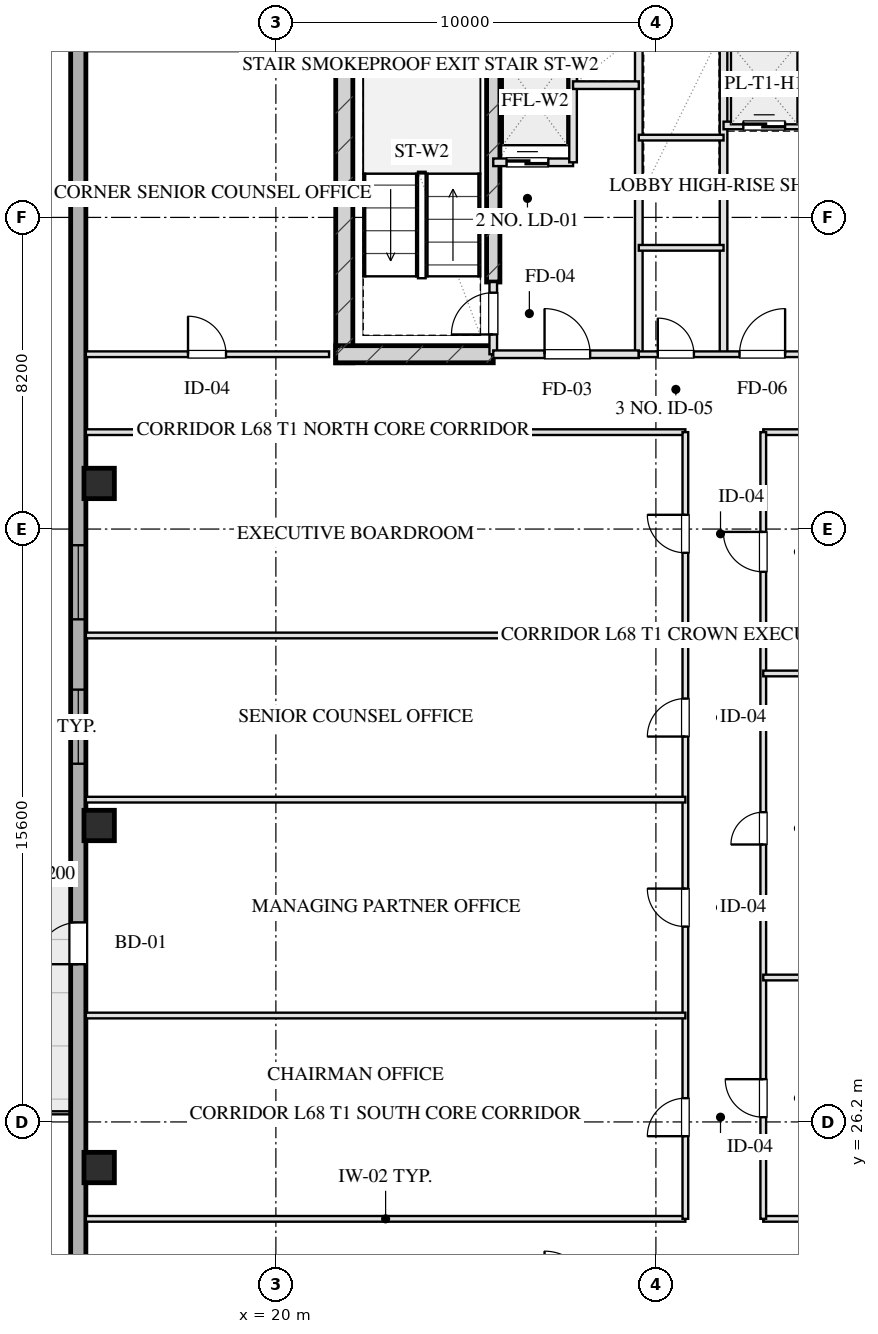
"""IFC4 building model, lengths in metres.
Left out: names, types, materials, properties, quantities, classifications, styles, units other than length and angle.
Written with IfcOpenShell. Run it as: python <this file> out.ifc"""

import sys

from ifc_helpers import new_model, si_unit, direction, frame, frame_2d, origin, origin_2d, place, context, subcontext, project, spatial, rectangle, hollow_rectangle, extrude, element, fill, save


model = new_model("IFC4")
c1 = context("Model", 3, precision=1e-05, world=origin(), true_north=direction((0.0, 1.0)))
c2 = subcontext(c1, "Body", "Model", "MODEL_VIEW")
j1 = project(units=[si_unit("LENGTHUNIT", "METRE"), si_unit("PLANEANGLEUNIT", "RADIAN")], contexts=[c1])
p1 = place(None, origin())
s1 = spatial("IfcSite", under=j1, at=p1, CompositionType="ELEMENT")
p2 = place(p1, origin())
s2 = spatial("IfcBuilding", under=s1, at=p2, CompositionType="ELEMENT")
p3 = place(p2, frame((0.0, 0.0, 250.4)))
s3 = spatial("IfcBuildingStorey", under=s2, at=p3, CompositionType="ELEMENT", Elevation=250.4)
p4 = place(p3, frame((21.8, 46.175, 0.0), z_axis=(0.0, 0.0, 1.0), x_axis=(0.0, 1.0, 0.0)))
e1 = element("IfcWall", 1, at=p4, inside=s3, PredefinedType="SHEAR", context=c2, shape_type="SweptSolid", body=[
    extrude(rectangle(XDim=9.33, YDim=0.45, at=frame_2d((4.665, 0.0))), origin(), (0.0, 0.0, 1.0), 3.2),
])
p5 = place(p3, frame((25.72, 48.3, 0.0), z_axis=(0.0, 0.0, 1.0), x_axis=(0.0, 1.0, 0.0)))
e2 = element("IfcWall", 2, at=p5, inside=s3, PredefinedType="SHEAR", context=c2, shape_type="SweptSolid", body=[
    extrude(rectangle(XDim=6.98, YDim=0.35, at=frame_2d((3.49, 0.0))), origin(), (0.0, 0.0, 1.0), 3.2),
])
p6 = place(p3, frame((21.575, 46.4, 0.0), z_axis=(0.0, 0.0, 1.0), x_axis=(1.0, 0.0, 0.0)))
e3 = element("IfcWall", 3, at=p6, inside=s3, PredefinedType="SHEAR", context=c2, shape_type="SweptSolid", body=[
    extrude(rectangle(XDim=4.145, YDim=0.45, at=frame_2d((2.073, 0.0))), origin(), (0.0, 0.0, 1.0), 3.2),
])
for number, where, z_axis, x_axis in (
    (4, (15.35, 25.0, 0.0), (0.0, 0.0, 1.0), (1.0, 0.0, 0.0)),
    (5, (15.35, 34.0, 0.0), (0.0, 0.0, 1.0), (1.0, 0.0, 0.0)),
    (6, (15.35, 43.0, 0.0), (0.0, 0.0, 1.0), (1.0, 0.0, 0.0)),
):
    element("IfcColumn", number, at=place(p3, frame(where, z_axis=z_axis, x_axis=x_axis)), inside=s3, PredefinedType="COLUMN", context=c2, shape_type="SweptSolid", body=[
        extrude(hollow_rectangle(XDim=0.8, YDim=0.8, WallThickness=0.028, at=origin_2d()), origin(), (0.0, 0.0, 1.0), 3.201),
    ])
p7 = place(p3, frame((14.8, 13.1, 0.0), z_axis=(0.0, 0.0, 1.0), x_axis=(0.0, 1.0, 0.0)))
e7 = element("IfcWall", 7, at=p7, inside=s3, PredefinedType="SOLIDWALL", context=c2, shape_type="SweptSolid", body=[
    extrude(rectangle(XDim=41.8, YDim=0.4, at=frame_2d((20.9, 0.0))), origin(), (0.0, 0.0, 1.0), 2.36),
])
p8 = place(p7, frame((22.525, 0.0, 0.75)))
e8 = element("IfcOpeningElement", 8, at=p8, cuts=e7, PredefinedType="OPENING", context=c2, shape_type="SweptSolid", body=[
    extrude(rectangle(XDim=1.95, YDim=1.21, at=frame_2d((0.975, 0.605))), frame((0.0, 0.21, 0.0), z_axis=(0.0, -1.0, 0.0), x_axis=(1.0, 0.0, 0.0)), (0.0, 0.0, 1.0), 0.42),
])
p9 = place(p7, frame((26.325, 0.0, 0.75)))
e9 = element("IfcOpeningElement", 9, at=p9, cuts=e7, PredefinedType="OPENING", context=c2, shape_type="SweptSolid", body=[
    extrude(rectangle(XDim=1.95, YDim=1.21, at=frame_2d((0.975, 0.605))), frame((0.0, 0.21, 0.0), z_axis=(0.0, -1.0, 0.0), x_axis=(1.0, 0.0, 0.0)), (0.0, 0.0, 1.0), 0.42),
])
p10 = place(p7, frame((17.25, 0.0, 0.0)))
e10 = element("IfcOpeningElement", 10, at=p10, cuts=e7, PredefinedType="OPENING", context=c2, shape_type="SweptSolid", body=[
    extrude(rectangle(XDim=1.1, YDim=2.15, at=frame_2d((0.55, 1.075))), frame((0.0, 0.21, 0.0), z_axis=(0.0, -1.0, 0.0), x_axis=(1.0, 0.0, 0.0)), (0.0, 0.0, 1.0), 0.42),
])
p11 = place(p3, frame((25.72, 46.4, 0.0), z_axis=(0.0, 0.0, 1.0), x_axis=(0.0, 1.0, 0.0)))
e11 = element("IfcWall", 11, at=p11, inside=s3, PredefinedType="PARTITIONING", context=c2, shape_type="SweptSolid", body=[
    extrude(rectangle(XDim=1.9, YDim=0.2, at=frame_2d((0.95, 0.0))), origin(), (0.0, 0.0, 1.0), 2.925),
])
p12 = place(p11, frame((0.52, 0.0, 0.0)))
e12 = element("IfcOpeningElement", 12, at=p12, cuts=e11, PredefinedType="OPENING", context=c2, shape_type="SweptSolid", body=[
    extrude(rectangle(XDim=1.1, YDim=2.05, at=frame_2d((0.55, 1.025))), frame((0.0, 0.11, 0.0), z_axis=(0.0, -1.0, 0.0), x_axis=(1.0, 0.0, 0.0)), (0.0, 0.0, 1.0), 0.22),
])
p13 = place(p3, frame((29.55, 46.4, 0.0), z_axis=(0.0, 0.0, 1.0), x_axis=(0.0, 1.0, 0.0)))
e13 = element("IfcWall", 13, at=p13, inside=s3, PredefinedType="PARTITIONING", context=c2, shape_type="SweptSolid", body=[
    extrude(rectangle(XDim=8.43, YDim=0.2, at=frame_2d((4.215, 0.0))), origin(), (0.0, 0.0, 1.0), 2.925),
])
p14 = place(p3, frame((25.72, 46.4, 0.0), z_axis=(0.0, 0.0, 1.0), x_axis=(1.0, 0.0, 0.0)))
e14 = element("IfcWall", 14, at=p14, inside=s3, PredefinedType="PARTITIONING", context=c2, shape_type="SweptSolid", body=[
    extrude(rectangle(XDim=3.83, YDim=0.2, at=frame_2d((1.915, 0.0))), origin(), (0.0, 0.0, 1.0), 2.925),
])
p15 = place(p14, frame((1.35, 0.0, 0.0)))
e15 = element("IfcOpeningElement", 15, at=p15, cuts=e14, PredefinedType="OPENING", context=c2, shape_type="SweptSolid", body=[
    extrude(rectangle(XDim=1.2, YDim=2.05, at=frame_2d((0.6, 1.025))), frame((0.0, 0.11, 0.0), z_axis=(0.0, -1.0, 0.0), x_axis=(1.0, 0.0, 0.0)), (0.0, 0.0, 1.0), 0.22),
])
p16 = place(p3, frame((25.72, 51.45, 0.0), z_axis=(0.0, 0.0, 1.0), x_axis=(1.0, 0.0, 0.0)))
e16 = element("IfcWall", 16, at=p16, inside=s3, PredefinedType="PARTITIONING", context=c2, shape_type="SweptSolid", body=[
    extrude(rectangle(XDim=2.1, YDim=0.2, at=frame_2d((1.05, 0.0))), origin(), (0.0, 0.0, 1.0), 2.925),
])
p17 = place(p16, frame((0.35, 0.0, 0.0)))
e17 = element("IfcOpeningElement", 17, at=p17, cuts=e16, PredefinedType="OPENING", context=c2, shape_type="SweptSolid", body=[
    extrude(rectangle(XDim=1.1, YDim=2.05, at=frame_2d((0.55, 1.025))), frame((0.0, 0.11, 0.0), z_axis=(0.0, -1.0, 0.0), x_axis=(1.0, 0.0, 0.0)), (0.0, 0.0, 1.0), 0.22),
])
p18 = place(p3, frame((27.82, 51.45, 0.0), z_axis=(0.0, 0.0, 1.0), x_axis=(0.0, 1.0, 0.0)))
e18 = element("IfcWall", 18, at=p18, inside=s3, PredefinedType="PARTITIONING", context=c2, shape_type="SweptSolid", body=[
    extrude(rectangle(XDim=3.7, YDim=0.2, at=frame_2d((1.85, 0.0))), origin(), (0.0, 0.0, 1.0), 2.925),
])
p19 = place(p3, frame((27.82, 53.48, 0.0), z_axis=(0.0, 0.0, 1.0), x_axis=(1.0, 0.0, 0.0)))
e19 = element("IfcWall", 19, at=p19, inside=s3, PredefinedType="PARTITIONING", context=c2, shape_type="SweptSolid", body=[
    extrude(rectangle(XDim=1.73, YDim=0.2, at=frame_2d((0.865, 0.0))), origin(), (0.0, 0.0, 1.0), 2.925),
])
p20 = place(p3, frame((31.78, 46.4, 0.0), z_axis=(0.0, 0.0, 1.0), x_axis=(0.0, 1.0, 0.0)))
e20 = element("IfcWall", 20, at=p20, inside=s3, PredefinedType="PARTITIONING", context=c2, shape_type="SweptSolid", body=[
    extrude(rectangle(XDim=8.43, YDim=0.2, at=frame_2d((4.215, 0.0))), origin(), (0.0, 0.0, 1.0), 2.925),
])
p21 = place(p3, frame((29.55, 46.4, 0.0), z_axis=(0.0, 0.0, 1.0), x_axis=(1.0, 0.0, 0.0)))
e21 = element("IfcWall", 21, at=p21, inside=s3, PredefinedType="PARTITIONING", context=c2, shape_type="SweptSolid", body=[
    extrude(rectangle(XDim=4.4, YDim=0.15, at=frame_2d((2.2, 0.0))), origin(), (0.0, 0.0, 1.0), 2.925),
])
p22 = place(p21, frame((0.5, 0.0, 0.0)))
e22 = element("IfcOpeningElement", 22, at=p22, cuts=e21, PredefinedType="OPENING", context=c2, shape_type="SweptSolid", body=[
    extrude(rectangle(XDim=0.95, YDim=2.05, at=frame_2d((0.475, 1.025))), frame((0.0, 0.085, 0.0), z_axis=(0.0, -1.0, 0.0), x_axis=(1.0, 0.0, 0.0)), (0.0, 0.0, 1.0), 0.17),
])
p23 = place(p21, frame((2.65, 0.0, 0.0)))
e23 = element("IfcOpeningElement", 23, at=p23, cuts=e21, PredefinedType="OPENING", context=c2, shape_type="SweptSolid", body=[
    extrude(rectangle(XDim=1.2, YDim=2.05, at=frame_2d((0.6, 1.025))), frame((0.0, 0.085, 0.0), z_axis=(0.0, -1.0, 0.0), x_axis=(1.0, 0.0, 0.0)), (0.0, 0.0, 1.0), 0.17),
])
for number, where, z_axis, x_axis in (
    (24, (29.55, 49.2, 0.0), (0.0, 0.0, 1.0), (1.0, 0.0, 0.0)),
    (25, (29.55, 52.1, 0.0), (0.0, 0.0, 1.0), (1.0, 0.0, 0.0)),
):
    element("IfcWall", number, at=place(p3, frame(where, z_axis=z_axis, x_axis=x_axis)), inside=s3, PredefinedType="PARTITIONING", context=c2, shape_type="SweptSolid", body=[
        extrude(rectangle(XDim=2.23, YDim=0.15, at=frame_2d((1.115, 0.0))), origin(), (0.0, 0.0, 1.0), 2.925),
    ])
p24 = place(p3, frame((31.78, 52.42, 0.0), z_axis=(0.0, 0.0, 1.0), x_axis=(1.0, 0.0, 0.0)))
e26 = element("IfcWall", 26, at=p24, inside=s3, PredefinedType="PARTITIONING", context=c2, shape_type="SweptSolid", body=[
    extrude(rectangle(XDim=2.17, YDim=0.2, at=frame_2d((1.085, 0.0))), origin(), (0.0, 0.0, 1.0), 2.925),
])
p25 = place(p24, frame((0.52, 0.0, 0.0)))
e27 = element("IfcOpeningElement", 27, at=p25, cuts=e26, PredefinedType="OPENING", context=c2, shape_type="SweptSolid", body=[
    extrude(rectangle(XDim=1.1, YDim=2.05, at=frame_2d((0.55, 1.025))), frame((0.0, 0.11, 0.0), z_axis=(0.0, -1.0, 0.0), x_axis=(1.0, 0.0, 0.0)), (0.0, 0.0, 1.0), 0.22),
])
p26 = place(p3, frame((15.0, 46.4, 0.0), z_axis=(0.0, 0.0, 1.0), x_axis=(1.0, 0.0, 0.0)))
e28 = element("IfcWall", 28, at=p26, inside=s3, PredefinedType="PARTITIONING", context=c2, shape_type="SweptSolid", body=[
    extrude(rectangle(XDim=6.4, YDim=0.15, at=frame_2d((3.2, 0.0))), origin(), (0.0, 0.0, 1.0), 2.925),
])
p27 = place(p26, frame((2.688, 0.0, 0.0)))
e29 = element("IfcOpeningElement", 29, at=p27, cuts=e28, PredefinedType="OPENING", context=c2, shape_type="SweptSolid", body=[
    extrude(rectangle(XDim=1.0, YDim=2.05, at=frame_2d((0.5, 1.025))), frame((0.0, 0.085, 0.0), z_axis=(0.0, -1.0, 0.0), x_axis=(1.0, 0.0, 0.0)), (0.0, 0.0, 1.0), 0.17),
])
p28 = place(p3, frame((15.0, 23.65, 0.0), z_axis=(0.0, 0.0, 1.0), x_axis=(1.0, 0.0, 0.0)))
e30 = element("IfcWall", 30, at=p28, inside=s3, PredefinedType="PARTITIONING", context=c2, shape_type="SweptSolid", body=[
    extrude(rectangle(XDim=15.775, YDim=0.15, at=frame_2d((7.887, 0.0))), origin(), (0.0, 0.0, 1.0), 2.925),
])
p29 = place(p3, frame((32.825, 23.65, 0.0), z_axis=(0.0, 0.0, 1.0), x_axis=(1.0, 0.0, 0.0)))
e31 = element("IfcWall", 31, at=p29, inside=s3, PredefinedType="PARTITIONING", context=c2, shape_type="SweptSolid", body=[
    extrude(rectangle(XDim=12.175, YDim=0.15, at=frame_2d((6.087, 0.0))), origin(), (0.0, 0.0, 1.0), 2.925),
])
p30 = place(p3, frame((15.0, 44.35, 0.0), z_axis=(0.0, 0.0, 1.0), x_axis=(1.0, 0.0, 0.0)))
e32 = element("IfcWall", 32, at=p30, inside=s3, PredefinedType="PARTITIONING", context=c2, shape_type="SweptSolid", body=[
    extrude(rectangle(XDim=15.775, YDim=0.15, at=frame_2d((7.887, 0.0))), origin(), (0.0, 0.0, 1.0), 2.925),
])
p31 = place(p3, frame((32.825, 44.35, 0.0), z_axis=(0.0, 0.0, 1.0), x_axis=(1.0, 0.0, 0.0)))
e33 = element("IfcWall", 33, at=p31, inside=s3, PredefinedType="PARTITIONING", context=c2, shape_type="SweptSolid", body=[
    extrude(rectangle(XDim=12.175, YDim=0.15, at=frame_2d((6.087, 0.0))), origin(), (0.0, 0.0, 1.0), 2.925),
])
p32 = place(p3, frame((30.775, 23.65, 0.0), z_axis=(0.0, 0.0, 1.0), x_axis=(0.0, 1.0, 0.0)))
e34 = element("IfcWall", 34, at=p32, inside=s3, PredefinedType="PARTITIONING", context=c2, shape_type="SweptSolid", body=[
    extrude(rectangle(XDim=20.7, YDim=0.15, at=frame_2d((10.35, 0.0))), origin(), (0.0, 0.0, 1.0), 2.925),
])
p33 = place(p32, frame((2.175, 0.0, 0.0)))
e35 = element("IfcOpeningElement", 35, at=p33, cuts=e34, PredefinedType="OPENING", context=c2, shape_type="SweptSolid", body=[
    extrude(rectangle(XDim=1.0, YDim=2.05, at=frame_2d((0.5, 1.025))), frame((0.0, 0.085, 0.0), z_axis=(0.0, -1.0, 0.0), x_axis=(1.0, 0.0, 0.0)), (0.0, 0.0, 1.0), 0.17),
])
p34 = place(p32, frame((7.69, 0.0, 0.0)))
e36 = element("IfcOpeningElement", 36, at=p34, cuts=e34, PredefinedType="OPENING", context=c2, shape_type="SweptSolid", body=[
    extrude(rectangle(XDim=1.0, YDim=2.05, at=frame_2d((0.5, 1.025))), frame((0.0, 0.085, 0.0), z_axis=(0.0, -1.0, 0.0), x_axis=(1.0, 0.0, 0.0)), (0.0, 0.0, 1.0), 0.17),
])
p35 = place(p32, frame((12.69, 0.0, 0.0)))
e37 = element("IfcOpeningElement", 37, at=p35, cuts=e34, PredefinedType="OPENING", context=c2, shape_type="SweptSolid", body=[
    extrude(rectangle(XDim=1.0, YDim=2.05, at=frame_2d((0.5, 1.025))), frame((0.0, 0.085, 0.0), z_axis=(0.0, -1.0, 0.0), x_axis=(1.0, 0.0, 0.0)), (0.0, 0.0, 1.0), 0.17),
])
p36 = place(p32, frame((17.525, 0.0, 0.0)))
e38 = element("IfcOpeningElement", 38, at=p36, cuts=e34, PredefinedType="OPENING", context=c2, shape_type="SweptSolid", body=[
    extrude(rectangle(XDim=1.0, YDim=2.05, at=frame_2d((0.5, 1.025))), frame((0.0, 0.085, 0.0), z_axis=(0.0, -1.0, 0.0), x_axis=(1.0, 0.0, 0.0)), (0.0, 0.0, 1.0), 0.17),
])
p37 = place(p3, frame((32.825, 23.65, 0.0), z_axis=(0.0, 0.0, 1.0), x_axis=(0.0, 1.0, 0.0)))
e39 = element("IfcWall", 39, at=p37, inside=s3, PredefinedType="PARTITIONING", context=c2, shape_type="SweptSolid", body=[
    extrude(rectangle(XDim=20.7, YDim=0.15, at=frame_2d((10.35, 0.0))), origin(), (0.0, 0.0, 1.0), 2.925),
])
p38 = place(p37, frame((2.675, 0.0, 0.0)))
e40 = element("IfcOpeningElement", 40, at=p38, cuts=e39, PredefinedType="OPENING", context=c2, shape_type="SweptSolid", body=[
    extrude(rectangle(XDim=1.0, YDim=2.05, at=frame_2d((0.5, 1.025))), frame((0.0, 0.085, 0.0), z_axis=(0.0, -1.0, 0.0), x_axis=(1.0, 0.0, 0.0)), (0.0, 0.0, 1.0), 0.17),
])
p39 = place(p37, frame((9.85, 0.0, 0.0)))
e41 = element("IfcOpeningElement", 41, at=p39, cuts=e39, PredefinedType="OPENING", context=c2, shape_type="SweptSolid", body=[
    extrude(rectangle(XDim=0.85, YDim=2.05, at=frame_2d((0.425, 1.025))), frame((0.0, 0.085, 0.0), z_axis=(0.0, -1.0, 0.0), x_axis=(1.0, 0.0, 0.0)), (0.0, 0.0, 1.0), 0.17),
])
p40 = place(p37, frame((17.025, 0.0, 0.0)))
e42 = element("IfcOpeningElement", 42, at=p40, cuts=e39, PredefinedType="OPENING", context=c2, shape_type="SweptSolid", body=[
    extrude(rectangle(XDim=1.05, YDim=2.05, at=frame_2d((0.525, 1.025))), frame((0.0, 0.085, 0.0), z_axis=(0.0, -1.0, 0.0), x_axis=(1.0, 0.0, 0.0)), (0.0, 0.0, 1.0), 0.17),
])
for number, where, z_axis, x_axis in (
    (43, (15.0, 29.0, 0.0), (0.0, 0.0, 1.0), (1.0, 0.0, 0.0)),
    (44, (15.0, 34.68, 0.0), (0.0, 0.0, 1.0), (1.0, 0.0, 0.0)),
    (45, (15.0, 39.0, 0.0), (0.0, 0.0, 1.0), (1.0, 0.0, 0.0)),
):
    element("IfcWall", number, at=place(p3, frame(where, z_axis=z_axis, x_axis=x_axis)), inside=s3, PredefinedType="PARTITIONING", context=c2, shape_type="SweptSolid", body=[
        extrude(rectangle(XDim=15.775, YDim=0.15, at=frame_2d((7.887, 0.0))), origin(), (0.0, 0.0, 1.0), 2.925),
    ])
for number, where, z_axis, x_axis in (
    (46, (32.825, 30.0, 0.0), (0.0, 0.0, 1.0), (1.0, 0.0, 0.0)),
    (47, (32.825, 38.0, 0.0), (0.0, 0.0, 1.0), (1.0, 0.0, 0.0)),
):
    element("IfcWall", number, at=place(p3, frame(where, z_axis=z_axis, x_axis=x_axis)), inside=s3, PredefinedType="PARTITIONING", context=c2, shape_type="SweptSolid", body=[
        extrude(rectangle(XDim=12.175, YDim=0.15, at=frame_2d((6.087, 0.0))), origin(), (0.0, 0.0, 1.0), 2.925),
    ])
p41 = place(p8, origin())
e48 = element("IfcWindow", 48, at=p41, inside=s3, PartitioningType="TRIPLE_PANEL_VERTICAL", PredefinedType="WINDOW", context=c2, shape_type="SweptSolid", body=[
    extrude(rectangle(XDim=1.95, YDim=1.21, at=frame_2d((0.975, 0.605))), frame((0.0, 0.03, 0.0), z_axis=(0.0, -1.0, 0.0), x_axis=(1.0, 0.0, 0.0)), (0.0, 0.0, 1.0), 0.06),
])
fill(e8, e48)
p42 = place(p9, origin())
e49 = element("IfcWindow", 49, at=p42, inside=s3, PartitioningType="TRIPLE_PANEL_VERTICAL", PredefinedType="WINDOW", context=c2, shape_type="SweptSolid", body=[
    extrude(rectangle(XDim=1.95, YDim=1.21, at=frame_2d((0.975, 0.605))), frame((0.0, 0.03, 0.0), z_axis=(0.0, -1.0, 0.0), x_axis=(1.0, 0.0, 0.0)), (0.0, 0.0, 1.0), 0.06),
])
fill(e9, e49)
p43 = place(p10, origin())
e50 = element("IfcDoor", 50, at=p43, inside=s3, OperationType="SINGLE_SWING_LEFT", PredefinedType="DOOR", context=c2, shape_type="SweptSolid", body=[
    extrude(rectangle(XDim=1.1, YDim=2.15, at=frame_2d((0.55, 1.075))), frame((0.0, 0.025, 0.0), z_axis=(0.0, -1.0, 0.0), x_axis=(1.0, 0.0, 0.0)), (0.0, 0.0, 1.0), 0.05),
])
fill(e10, e50)
p44 = place(p12, origin())
e51 = element("IfcDoor", 51, at=p44, inside=s3, OperationType="SINGLE_SWING_LEFT", PredefinedType="DOOR", context=c2, shape_type="SweptSolid", body=[
    extrude(rectangle(XDim=1.1, YDim=2.05, at=frame_2d((0.55, 1.025))), frame((0.0, 0.025, 0.0), z_axis=(0.0, -1.0, 0.0), x_axis=(1.0, 0.0, 0.0)), (0.0, 0.0, 1.0), 0.05),
])
fill(e12, e51)
p45 = place(p15, origin())
e52 = element("IfcDoor", 52, at=p45, inside=s3, OperationType="SINGLE_SWING_LEFT", PredefinedType="DOOR", context=c2, shape_type="SweptSolid", body=[
    extrude(rectangle(XDim=1.2, YDim=2.05, at=frame_2d((0.6, 1.025))), frame((0.0, 0.025, 0.0), z_axis=(0.0, -1.0, 0.0), x_axis=(1.0, 0.0, 0.0)), (0.0, 0.0, 1.0), 0.05),
])
fill(e15, e52)
p46 = place(p17, origin())
e53 = element("IfcDoor", 53, at=p46, inside=s3, OperationType="DOUBLE_DOOR_SLIDING", PredefinedType="DOOR", context=c2, shape_type="SweptSolid", body=[
    extrude(rectangle(XDim=1.1, YDim=2.05, at=frame_2d((0.55, 1.025))), frame((0.0, 0.025, 0.0), z_axis=(0.0, -1.0, 0.0), x_axis=(1.0, 0.0, 0.0)), (0.0, 0.0, 1.0), 0.05),
])
fill(e17, e53)
p47 = place(p22, origin())
e54 = element("IfcDoor", 54, at=p47, inside=s3, OperationType="SINGLE_SWING_LEFT", PredefinedType="DOOR", context=c2, shape_type="SweptSolid", body=[
    extrude(rectangle(XDim=0.95, YDim=2.05, at=frame_2d((0.475, 1.025))), frame((0.0, 0.025, 0.0), z_axis=(0.0, -1.0, 0.0), x_axis=(1.0, 0.0, 0.0)), (0.0, 0.0, 1.0), 0.05),
])
fill(e22, e54)
p48 = place(p23, origin())
e55 = element("IfcDoor", 55, at=p48, inside=s3, OperationType="SINGLE_SWING_RIGHT", PredefinedType="DOOR", context=c2, shape_type="SweptSolid", body=[
    extrude(rectangle(XDim=1.2, YDim=2.05, at=frame_2d((0.6, 1.025))), frame((0.0, 0.025, 0.0), z_axis=(0.0, -1.0, 0.0), x_axis=(1.0, 0.0, 0.0)), (0.0, 0.0, 1.0), 0.05),
])
fill(e23, e55)
p49 = place(p25, origin())
e56 = element("IfcDoor", 56, at=p49, inside=s3, OperationType="DOUBLE_DOOR_SLIDING", PredefinedType="DOOR", context=c2, shape_type="SweptSolid", body=[
    extrude(rectangle(XDim=1.1, YDim=2.05, at=frame_2d((0.55, 1.025))), frame((0.0, 0.025, 0.0), z_axis=(0.0, -1.0, 0.0), x_axis=(1.0, 0.0, 0.0)), (0.0, 0.0, 1.0), 0.05),
])
fill(e27, e56)
p50 = place(p27, origin())
e57 = element("IfcDoor", 57, at=p50, inside=s3, OperationType="SINGLE_SWING_LEFT", PredefinedType="DOOR", context=c2, shape_type="SweptSolid", body=[
    extrude(rectangle(XDim=1.0, YDim=2.05, at=frame_2d((0.5, 1.025))), frame((0.0, 0.025, 0.0), z_axis=(0.0, -1.0, 0.0), x_axis=(1.0, 0.0, 0.0)), (0.0, 0.0, 1.0), 0.05),
])
fill(e29, e57)
p51 = place(p33, origin())
e58 = element("IfcDoor", 58, at=p51, inside=s3, OperationType="SINGLE_SWING_LEFT", PredefinedType="DOOR", context=c2, shape_type="SweptSolid", body=[
    extrude(rectangle(XDim=1.0, YDim=2.05, at=frame_2d((0.5, 1.025))), frame((0.0, 0.025, 0.0), z_axis=(0.0, -1.0, 0.0), x_axis=(1.0, 0.0, 0.0)), (0.0, 0.0, 1.0), 0.05),
])
fill(e35, e58)
p52 = place(p34, origin())
e59 = element("IfcDoor", 59, at=p52, inside=s3, OperationType="SINGLE_SWING_RIGHT", PredefinedType="DOOR", context=c2, shape_type="SweptSolid", body=[
    extrude(rectangle(XDim=1.0, YDim=2.05, at=frame_2d((0.5, 1.025))), frame((0.0, 0.025, 0.0), z_axis=(0.0, -1.0, 0.0), x_axis=(1.0, 0.0, 0.0)), (0.0, 0.0, 1.0), 0.05),
])
fill(e36, e59)
p53 = place(p35, origin())
e60 = element("IfcDoor", 60, at=p53, inside=s3, OperationType="SINGLE_SWING_LEFT", PredefinedType="DOOR", context=c2, shape_type="SweptSolid", body=[
    extrude(rectangle(XDim=1.0, YDim=2.05, at=frame_2d((0.5, 1.025))), frame((0.0, 0.025, 0.0), z_axis=(0.0, -1.0, 0.0), x_axis=(1.0, 0.0, 0.0)), (0.0, 0.0, 1.0), 0.05),
])
fill(e37, e60)
p54 = place(p36, origin())
e61 = element("IfcDoor", 61, at=p54, inside=s3, OperationType="SINGLE_SWING_RIGHT", PredefinedType="DOOR", context=c2, shape_type="SweptSolid", body=[
    extrude(rectangle(XDim=1.0, YDim=2.05, at=frame_2d((0.5, 1.025))), frame((0.0, 0.025, 0.0), z_axis=(0.0, -1.0, 0.0), x_axis=(1.0, 0.0, 0.0)), (0.0, 0.0, 1.0), 0.05),
])
fill(e38, e61)
p55 = place(p38, origin())
e62 = element("IfcDoor", 62, at=p55, inside=s3, OperationType="SINGLE_SWING_RIGHT", PredefinedType="DOOR", context=c2, shape_type="SweptSolid", body=[
    extrude(rectangle(XDim=1.0, YDim=2.05, at=frame_2d((0.5, 1.025))), frame((0.0, 0.025, 0.0), z_axis=(0.0, -1.0, 0.0), x_axis=(1.0, 0.0, 0.0)), (0.0, 0.0, 1.0), 0.05),
])
fill(e40, e62)
p56 = place(p39, origin())
e63 = element("IfcDoor", 63, at=p56, inside=s3, OperationType="SINGLE_SWING_LEFT", PredefinedType="DOOR", context=c2, shape_type="SweptSolid", body=[
    extrude(rectangle(XDim=0.85, YDim=2.05, at=frame_2d((0.425, 1.025))), frame((0.0, 0.025, 0.0), z_axis=(0.0, -1.0, 0.0), x_axis=(1.0, 0.0, 0.0)), (0.0, 0.0, 1.0), 0.05),
])
fill(e41, e63)
p57 = place(p40, origin())
e64 = element("IfcDoor", 64, at=p57, inside=s3, OperationType="SINGLE_SWING_RIGHT", PredefinedType="DOOR", context=c2, shape_type="SweptSolid", body=[
    extrude(rectangle(XDim=1.05, YDim=2.05, at=frame_2d((0.525, 1.025))), frame((0.0, 0.025, 0.0), z_axis=(0.0, -1.0, 0.0), x_axis=(1.0, 0.0, 0.0)), (0.0, 0.0, 1.0), 0.05),
])
fill(e42, e64)
save(model, sys.argv[1])
